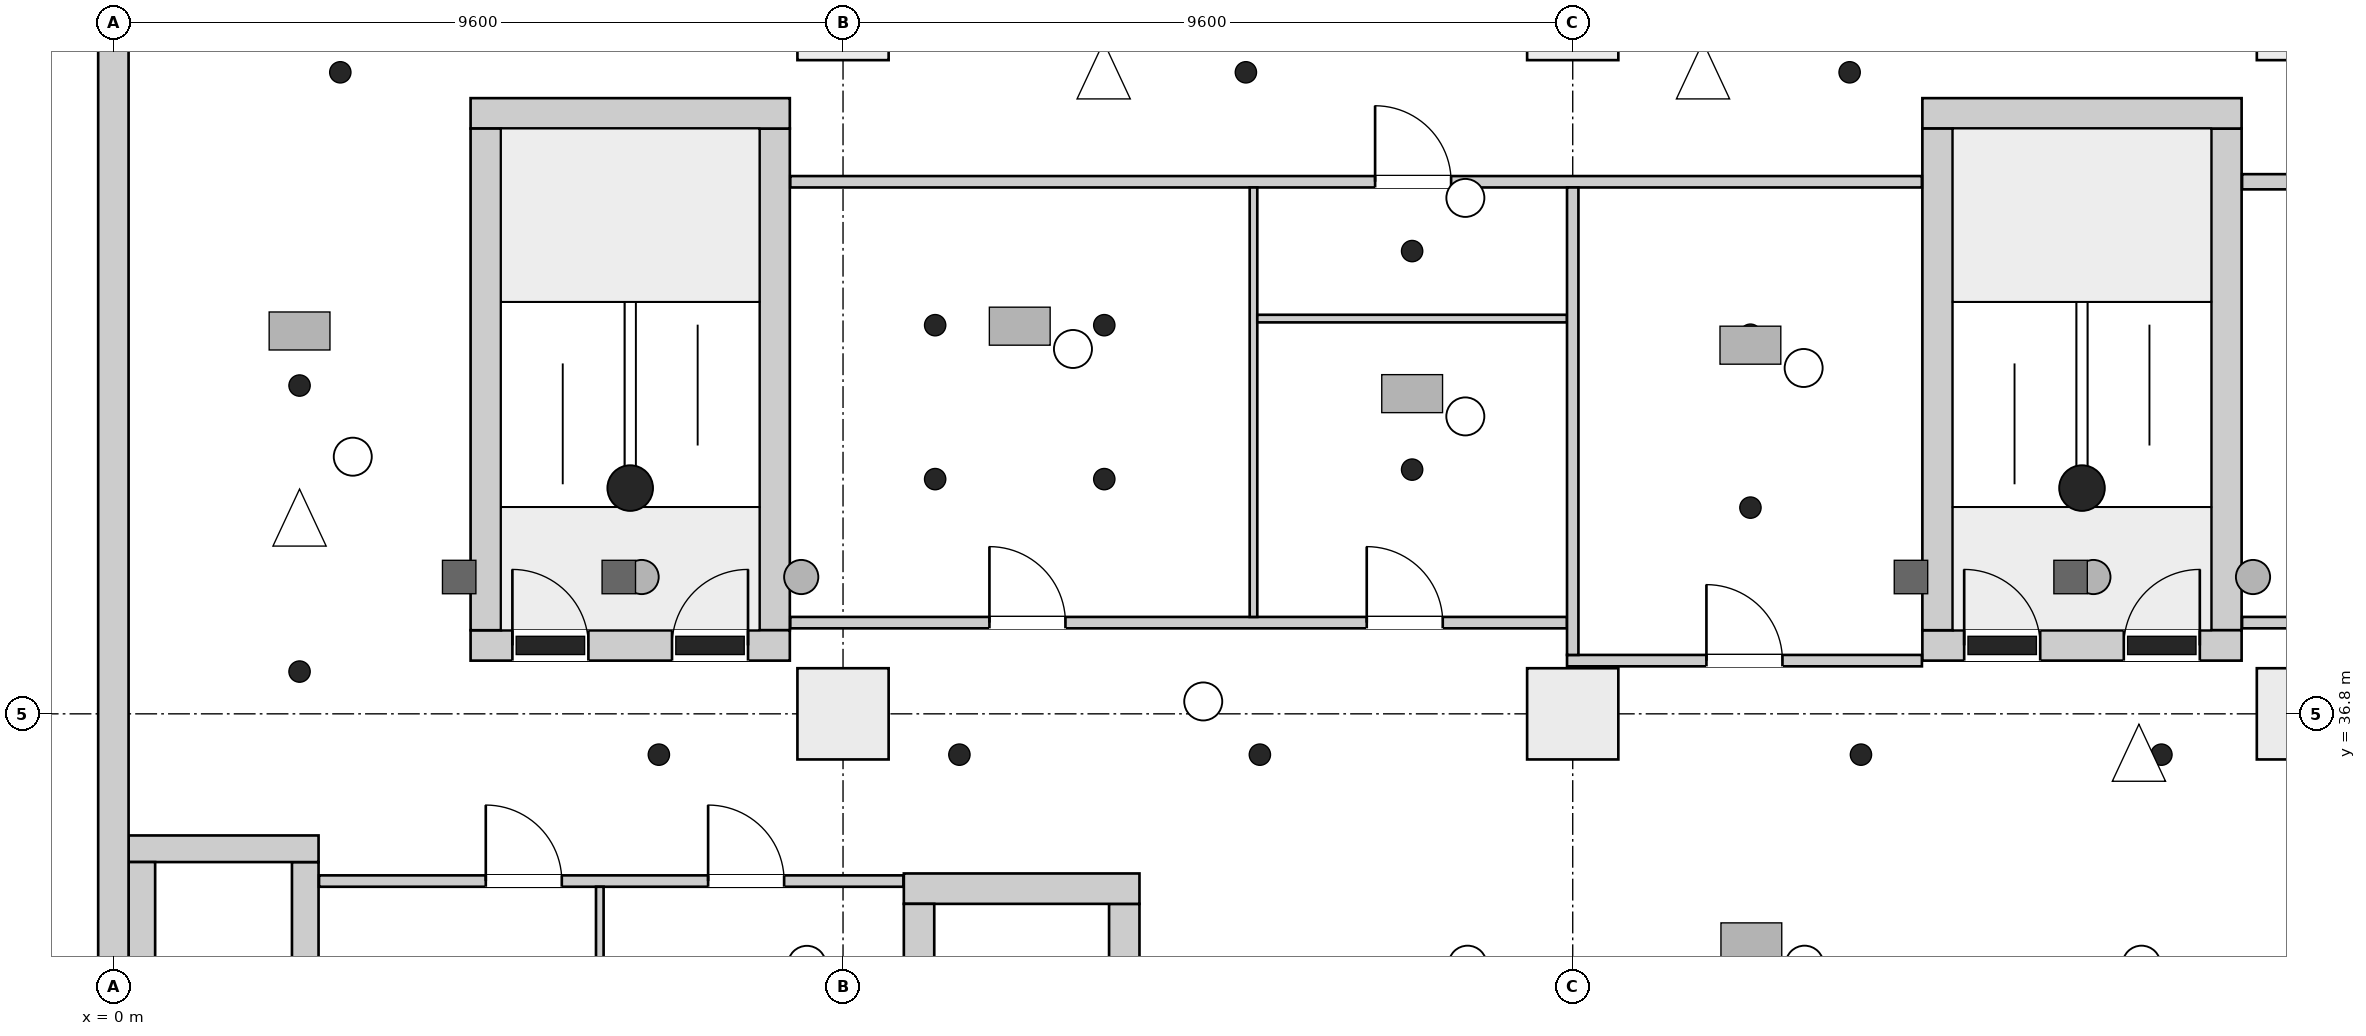
"""IFC4 building model, lengths in metres.
Left out: names, types, materials, properties, quantities, classifications, styles, units other than length and angle.
Written with IfcOpenShell. Run it as: python <this file> out.ifc"""

import sys

from ifc_helpers import new_model, si_unit, direction, frame, frame_2d, origin, origin_2d, place, context, subcontext, project, spatial, rectangle, extrude, element, fill, save


model = new_model("IFC4")
c1 = context("Model", 3, precision=1e-05, world=origin(), true_north=direction((0.0, 1.0)))
c2 = subcontext(c1, "Body", "Model", "MODEL_VIEW")
j1 = project(units=[si_unit("LENGTHUNIT", "METRE"), si_unit("PLANEANGLEUNIT", "RADIAN")], contexts=[c1])
p1 = place(None, origin())
s1 = spatial("IfcSite", under=j1, at=p1, CompositionType="ELEMENT")
p2 = place(p1, origin())
s2 = spatial("IfcBuilding", under=s1, at=p2, CompositionType="ELEMENT")
p3 = place(p2, frame((0.0, 0.0, 21.7)))
s3 = spatial("IfcBuildingStorey", under=s2, at=p3, CompositionType="ELEMENT", Elevation=21.7)
p4 = place(p3, frame((0.0, -0.2, 0.0), z_axis=(0.0, 0.0, 1.0), x_axis=(0.0, 1.0, 0.0)))
e1 = element("IfcWall", 1, at=p4, inside=s3, PredefinedType="SHEAR", context=c2, shape_type="SweptSolid", body=[
    extrude(rectangle(XDim=46.88, YDim=0.4, at=frame_2d((23.44, 0.0))), origin(), (0.0, 0.0, 1.0), 5.0),
])
p5 = place(p3, frame((4.7, 37.7, 0.0), z_axis=(0.0, 0.0, 1.0), x_axis=(1.0, 0.0, 0.0)))
e2 = element("IfcWall", 2, at=p5, inside=s3, PredefinedType="SHEAR", context=c2, shape_type="SweptSolid", body=[
    extrude(rectangle(XDim=4.2, YDim=0.4, at=frame_2d((2.1, 0.0))), origin(), (0.0, 0.0, 1.0), 5.0),
])
p6 = place(p5, frame((0.55, 0.0, 0.0)))
e3 = element("IfcOpeningElement", 3, at=p6, cuts=e2, PredefinedType="OPENING", context=c2, shape_type="SweptSolid", body=[
    extrude(rectangle(XDim=1.0, YDim=2.1, at=frame_2d((0.5, 1.05))), frame((0.0, 0.21, 0.0), z_axis=(0.0, -1.0, 0.0), x_axis=(1.0, 0.0, 0.0)), (0.0, 0.0, 1.0), 0.42),
])
p7 = place(p5, frame((2.65, 0.0, 0.0)))
e4 = element("IfcOpeningElement", 4, at=p7, cuts=e2, PredefinedType="OPENING", context=c2, shape_type="SweptSolid", body=[
    extrude(rectangle(XDim=1.0, YDim=2.1, at=frame_2d((0.5, 1.05))), frame((0.0, 0.21, 0.0), z_axis=(0.0, -1.0, 0.0), x_axis=(1.0, 0.0, 0.0)), (0.0, 0.0, 1.0), 0.42),
])
p8 = place(p3, frame((4.7, 44.7, 0.0), z_axis=(0.0, 0.0, 1.0), x_axis=(1.0, 0.0, 0.0)))
e5 = element("IfcWall", 5, at=p8, inside=s3, PredefinedType="SHEAR", context=c2, shape_type="SweptSolid", body=[
    extrude(rectangle(XDim=4.2, YDim=0.4, at=frame_2d((2.1, 0.0))), origin(), (0.0, 0.0, 1.0), 5.0),
])
for number, where, z_axis, x_axis in (
    (6, (4.9, 37.9, 0.0), (0.0, 0.0, 1.0), (0.0, 1.0, 0.0)),
    (7, (8.7, 37.9, 0.0), (0.0, 0.0, 1.0), (0.0, 1.0, 0.0)),
):
    element("IfcWall", number, at=place(p3, frame(where, z_axis=z_axis, x_axis=x_axis)), inside=s3, PredefinedType="SHEAR", context=c2, shape_type="SweptSolid", body=[
        extrude(rectangle(XDim=6.6, YDim=0.4, at=frame_2d((3.3, 0.0))), origin(), (0.0, 0.0, 1.0), 5.0),
    ])
p9 = place(p3, frame((23.8, 37.7, 0.0), z_axis=(0.0, 0.0, 1.0), x_axis=(1.0, 0.0, 0.0)))
e8 = element("IfcWall", 8, at=p9, inside=s3, PredefinedType="SHEAR", context=c2, shape_type="SweptSolid", body=[
    extrude(rectangle(XDim=4.2, YDim=0.4, at=frame_2d((2.1, 0.0))), origin(), (0.0, 0.0, 1.0), 5.0),
])
p10 = place(p9, frame((0.55, 0.0, 0.0)))
e9 = element("IfcOpeningElement", 9, at=p10, cuts=e8, PredefinedType="OPENING", context=c2, shape_type="SweptSolid", body=[
    extrude(rectangle(XDim=1.0, YDim=2.1, at=frame_2d((0.5, 1.05))), frame((0.0, 0.21, 0.0), z_axis=(0.0, -1.0, 0.0), x_axis=(1.0, 0.0, 0.0)), (0.0, 0.0, 1.0), 0.42),
])
p11 = place(p9, frame((2.65, 0.0, 0.0)))
e10 = element("IfcOpeningElement", 10, at=p11, cuts=e8, PredefinedType="OPENING", context=c2, shape_type="SweptSolid", body=[
    extrude(rectangle(XDim=1.0, YDim=2.1, at=frame_2d((0.5, 1.05))), frame((0.0, 0.21, 0.0), z_axis=(0.0, -1.0, 0.0), x_axis=(1.0, 0.0, 0.0)), (0.0, 0.0, 1.0), 0.42),
])
p12 = place(p3, frame((23.8, 44.7, 0.0), z_axis=(0.0, 0.0, 1.0), x_axis=(1.0, 0.0, 0.0)))
e11 = element("IfcWall", 11, at=p12, inside=s3, PredefinedType="SHEAR", context=c2, shape_type="SweptSolid", body=[
    extrude(rectangle(XDim=4.2, YDim=0.4, at=frame_2d((2.1, 0.0))), origin(), (0.0, 0.0, 1.0), 5.0),
])
for number, where, z_axis, x_axis in (
    (12, (24.0, 37.9, 0.0), (0.0, 0.0, 1.0), (0.0, 1.0, 0.0)),
    (13, (27.8, 37.9, 0.0), (0.0, 0.0, 1.0), (0.0, 1.0, 0.0)),
):
    element("IfcWall", number, at=place(p3, frame(where, z_axis=z_axis, x_axis=x_axis)), inside=s3, PredefinedType="SHEAR", context=c2, shape_type="SweptSolid", body=[
        extrude(rectangle(XDim=6.6, YDim=0.4, at=frame_2d((3.3, 0.0))), origin(), (0.0, 0.0, 1.0), 5.0),
    ])
p13 = place(p3, frame((0.2, 35.025, 0.0), z_axis=(0.0, 0.0, 1.0), x_axis=(1.0, 0.0, 0.0)))
e14 = element("IfcWall", 14, at=p13, inside=s3, PredefinedType="SHEAR", context=c2, shape_type="SweptSolid", body=[
    extrude(rectangle(XDim=2.5, YDim=0.35, at=frame_2d((1.25, 0.0))), origin(), (0.0, 0.0, 1.0), 5.0),
])
for number, where, z_axis, x_axis in (
    (15, (0.375, 31.35, 0.0), (0.0, 0.0, 1.0), (0.0, 1.0, 0.0)),
    (16, (2.525, 31.35, 0.0), (0.0, 0.0, 1.0), (0.0, 1.0, 0.0)),
):
    element("IfcWall", number, at=place(p3, frame(where, z_axis=z_axis, x_axis=x_axis)), inside=s3, PredefinedType="SHEAR", context=c2, shape_type="SweptSolid", body=[
        extrude(rectangle(XDim=3.5, YDim=0.35, at=frame_2d((1.75, 0.0))), origin(), (0.0, 0.0, 1.0), 5.0),
    ])
p14 = place(p3, frame((10.4, 34.5, 0.0), z_axis=(0.0, 0.0, 1.0), x_axis=(1.0, 0.0, 0.0)))
e17 = element("IfcWall", 17, at=p14, inside=s3, PredefinedType="SHEAR", context=c2, shape_type="SweptSolid", body=[
    extrude(rectangle(XDim=3.1, YDim=0.4, at=frame_2d((1.55, 0.0))), origin(), (0.0, 0.0, 1.0), 5.0),
])
for number, where, z_axis, x_axis in (
    (18, (10.6, 30.9, 0.0), (0.0, 0.0, 1.0), (0.0, 1.0, 0.0)),
    (19, (13.3, 30.9, 0.0), (0.0, 0.0, 1.0), (0.0, 1.0, 0.0)),
):
    element("IfcWall", number, at=place(p3, frame(where, z_axis=z_axis, x_axis=x_axis)), inside=s3, PredefinedType="SHEAR", context=c2, shape_type="SweptSolid", body=[
        extrude(rectangle(XDim=3.4, YDim=0.4, at=frame_2d((1.7, 0.0))), origin(), (0.0, 0.0, 1.0), 5.0),
    ])
for number, where, z_axis, x_axis in (
    (20, (9.6, 36.8, 0.0), (0.0, 0.0, 1.0), (1.0, 0.0, 0.0)),
    (21, (19.2, 36.8, 0.0), (0.0, 0.0, 1.0), (1.0, 0.0, 0.0)),
    (22, (28.8, 36.8, 0.0), (0.0, 0.0, 1.0), (1.0, 0.0, 0.0)),
    (23, (9.6, 46.0, 0.0), (0.0, 0.0, 1.0), (1.0, 0.0, 0.0)),
    (24, (19.2, 46.0, 0.0), (0.0, 0.0, 1.0), (1.0, 0.0, 0.0)),
    (25, (28.8, 46.0, 0.0), (0.0, 0.0, 1.0), (1.0, 0.0, 0.0)),
):
    element("IfcColumn", number, at=place(p3, frame(where, z_axis=z_axis, x_axis=x_axis)), inside=s3, PredefinedType="COLUMN", context=c2, shape_type="SweptSolid", body=[
        extrude(rectangle(XDim=1.2, YDim=1.2, at=origin_2d()), origin(), (0.0, 0.0, 1.0), 5.0),
    ])
p15 = place(p3, frame((2.706, 34.6, 0.0), z_axis=(0.0, 0.0, 1.0), x_axis=(1.0, 0.0, 0.0)))
e26 = element("IfcWall", 26, at=p15, inside=s3, PredefinedType="PARTITIONING", context=c2, shape_type="SweptSolid", body=[
    extrude(rectangle(XDim=7.688, YDim=0.15, at=frame_2d((3.844, 0.0))), origin(), (0.0, 0.0, 1.0), 4.65),
])
p16 = place(p15, frame((2.194, 0.0, 0.0)))
e27 = element("IfcOpeningElement", 27, at=p16, cuts=e26, PredefinedType="OPENING", context=c2, shape_type="SweptSolid", body=[
    extrude(rectangle(XDim=1.0, YDim=2.1, at=frame_2d((0.5, 1.05))), frame((0.0, 0.085, 0.0), z_axis=(0.0, -1.0, 0.0), x_axis=(1.0, 0.0, 0.0)), (0.0, 0.0, 1.0), 0.17),
])
p17 = place(p15, frame((5.119, 0.0, 0.0)))
e28 = element("IfcOpeningElement", 28, at=p17, cuts=e26, PredefinedType="OPENING", context=c2, shape_type="SweptSolid", body=[
    extrude(rectangle(XDim=1.0, YDim=2.1, at=frame_2d((0.5, 1.05))), frame((0.0, 0.085, 0.0), z_axis=(0.0, -1.0, 0.0), x_axis=(1.0, 0.0, 0.0)), (0.0, 0.0, 1.0), 0.17),
])
p18 = place(p3, frame((6.4, 24.875, 0.0), z_axis=(0.0, 0.0, 1.0), x_axis=(0.0, 1.0, 0.0)))
e29 = element("IfcWall", 29, at=p18, inside=s3, PredefinedType="PARTITIONING", context=c2, shape_type="SweptSolid", body=[
    extrude(rectangle(XDim=9.65, YDim=0.1, at=frame_2d((4.825, 0.0))), origin(), (0.0, 0.0, 1.0), 4.65),
])
p19 = place(p3, frame((8.906, 38.0, 0.0), z_axis=(0.0, 0.0, 1.0), x_axis=(1.0, 0.0, 0.0)))
e30 = element("IfcWall", 30, at=p19, inside=s3, PredefinedType="PARTITIONING", context=c2, shape_type="SweptSolid", body=[
    extrude(rectangle(XDim=10.219, YDim=0.15, at=frame_2d((5.109, 0.0))), origin(), (0.0, 0.0, 1.0), 4.65),
])
p20 = place(p19, frame((2.62, 0.0, 0.0)))
e31 = element("IfcOpeningElement", 31, at=p20, cuts=e30, PredefinedType="OPENING", context=c2, shape_type="SweptSolid", body=[
    extrude(rectangle(XDim=1.0, YDim=2.1, at=frame_2d((0.5, 1.05))), frame((0.0, 0.085, 0.0), z_axis=(0.0, -1.0, 0.0), x_axis=(1.0, 0.0, 0.0)), (0.0, 0.0, 1.0), 0.17),
])
p21 = place(p19, frame((7.584, 0.0, 0.0)))
e32 = element("IfcOpeningElement", 32, at=p21, cuts=e30, PredefinedType="OPENING", context=c2, shape_type="SweptSolid", body=[
    extrude(rectangle(XDim=1.0, YDim=2.1, at=frame_2d((0.5, 1.05))), frame((0.0, 0.085, 0.0), z_axis=(0.0, -1.0, 0.0), x_axis=(1.0, 0.0, 0.0)), (0.0, 0.0, 1.0), 0.17),
])
p22 = place(p3, frame((8.906, 43.8, 0.0), z_axis=(0.0, 0.0, 1.0), x_axis=(1.0, 0.0, 0.0)))
e33 = element("IfcWall", 33, at=p22, inside=s3, PredefinedType="PARTITIONING", context=c2, shape_type="SweptSolid", body=[
    extrude(rectangle(XDim=14.888, YDim=0.15, at=frame_2d((7.444, 0.0))), origin(), (0.0, 0.0, 1.0), 4.65),
])
p23 = place(p22, frame((7.694, 0.0, 0.0)))
e34 = element("IfcOpeningElement", 34, at=p23, cuts=e33, PredefinedType="OPENING", context=c2, shape_type="SweptSolid", body=[
    extrude(rectangle(XDim=1.0, YDim=2.1, at=frame_2d((0.5, 1.05))), frame((0.0, 0.085, 0.0), z_axis=(0.0, -1.0, 0.0), x_axis=(1.0, 0.0, 0.0)), (0.0, 0.0, 1.0), 0.17),
])
p24 = place(p3, frame((15.0, 38.075, 0.0), z_axis=(0.0, 0.0, 1.0), x_axis=(0.0, 1.0, 0.0)))
e35 = element("IfcWall", 35, at=p24, inside=s3, PredefinedType="PARTITIONING", context=c2, shape_type="SweptSolid", body=[
    extrude(rectangle(XDim=5.65, YDim=0.1, at=frame_2d((2.825, 0.0))), origin(), (0.0, 0.0, 1.0), 4.65),
])
p25 = place(p3, frame((15.05, 42.0, 0.0), z_axis=(0.0, 0.0, 1.0), x_axis=(1.0, 0.0, 0.0)))
e36 = element("IfcWall", 36, at=p25, inside=s3, PredefinedType="PARTITIONING", context=c2, shape_type="SweptSolid", body=[
    extrude(rectangle(XDim=4.075, YDim=0.1, at=frame_2d((2.038, 0.0))), origin(), (0.0, 0.0, 1.0), 4.65),
])
p26 = place(p3, frame((19.125, 37.5, 0.0), z_axis=(0.0, 0.0, 1.0), x_axis=(1.0, 0.0, 0.0)))
e37 = element("IfcWall", 37, at=p26, inside=s3, PredefinedType="PARTITIONING", context=c2, shape_type="SweptSolid", body=[
    extrude(rectangle(XDim=4.669, YDim=0.15, at=frame_2d((2.334, 0.0))), origin(), (0.0, 0.0, 1.0), 4.65),
])
p27 = place(p26, frame((1.834, 0.0, 0.0)))
e38 = element("IfcOpeningElement", 38, at=p27, cuts=e37, PredefinedType="OPENING", context=c2, shape_type="SweptSolid", body=[
    extrude(rectangle(XDim=1.0, YDim=2.1, at=frame_2d((0.5, 1.05))), frame((0.0, 0.085, 0.0), z_axis=(0.0, -1.0, 0.0), x_axis=(1.0, 0.0, 0.0)), (0.0, 0.0, 1.0), 0.17),
])
p28 = place(p3, frame((19.2, 37.575, 0.0), z_axis=(0.0, 0.0, 1.0), x_axis=(0.0, 1.0, 0.0)))
e39 = element("IfcWall", 39, at=p28, inside=s3, PredefinedType="PARTITIONING", context=c2, shape_type="SweptSolid", body=[
    extrude(rectangle(XDim=6.15, YDim=0.15, at=frame_2d((3.075, 0.0))), origin(), (0.0, 0.0, 1.0), 4.25),
])
p29 = place(p3, frame((28.006, 38.0, 0.0), z_axis=(0.0, 0.0, 1.0), x_axis=(1.0, 0.0, 0.0)))
e40 = element("IfcWall", 40, at=p29, inside=s3, PredefinedType="PARTITIONING", context=c2, shape_type="SweptSolid", body=[
    extrude(rectangle(XDim=1.894, YDim=0.15, at=frame_2d((0.947, 0.0))), origin(), (0.0, 0.0, 1.0), 4.65),
])
p30 = place(p3, frame((28.006, 43.8, 0.0), z_axis=(0.0, 0.0, 1.0), x_axis=(1.0, 0.0, 0.0)))
e41 = element("IfcWall", 41, at=p30, inside=s3, PredefinedType="PARTITIONING", context=c2, shape_type="SweptSolid", body=[
    extrude(rectangle(XDim=29.388, YDim=0.2, at=frame_2d((14.694, 0.0))), origin(), (0.0, 0.0, 1.0), 4.65),
])
p31 = place(p6, origin())
e42 = element("IfcDoor", 42, at=p31, inside=s3, OperationType="SINGLE_SWING_RIGHT", PredefinedType="DOOR", context=c2, shape_type="SweptSolid", body=[
    extrude(rectangle(XDim=1.0, YDim=2.1, at=frame_2d((0.5, 1.05))), frame((0.0, 0.025, 0.0), z_axis=(0.0, -1.0, 0.0), x_axis=(1.0, 0.0, 0.0)), (0.0, 0.0, 1.0), 0.05),
])
fill(e3, e42)
p32 = place(p7, origin())
e43 = element("IfcDoor", 43, at=p32, inside=s3, OperationType="SINGLE_SWING_LEFT", PredefinedType="DOOR", context=c2, shape_type="SweptSolid", body=[
    extrude(rectangle(XDim=1.0, YDim=2.1, at=frame_2d((0.5, 1.05))), frame((0.0, 0.025, 0.0), z_axis=(0.0, -1.0, 0.0), x_axis=(1.0, 0.0, 0.0)), (0.0, 0.0, 1.0), 0.05),
])
fill(e4, e43)
p33 = place(p10, origin())
e44 = element("IfcDoor", 44, at=p33, inside=s3, OperationType="SINGLE_SWING_RIGHT", PredefinedType="DOOR", context=c2, shape_type="SweptSolid", body=[
    extrude(rectangle(XDim=1.0, YDim=2.1, at=frame_2d((0.5, 1.05))), frame((0.0, 0.025, 0.0), z_axis=(0.0, -1.0, 0.0), x_axis=(1.0, 0.0, 0.0)), (0.0, 0.0, 1.0), 0.05),
])
fill(e9, e44)
p34 = place(p11, origin())
e45 = element("IfcDoor", 45, at=p34, inside=s3, OperationType="SINGLE_SWING_LEFT", PredefinedType="DOOR", context=c2, shape_type="SweptSolid", body=[
    extrude(rectangle(XDim=1.0, YDim=2.1, at=frame_2d((0.5, 1.05))), frame((0.0, 0.025, 0.0), z_axis=(0.0, -1.0, 0.0), x_axis=(1.0, 0.0, 0.0)), (0.0, 0.0, 1.0), 0.05),
])
fill(e10, e45)
p35 = place(p16, origin())
e46 = element("IfcDoor", 46, at=p35, inside=s3, OperationType="SINGLE_SWING_RIGHT", PredefinedType="DOOR", context=c2, shape_type="SweptSolid", body=[
    extrude(rectangle(XDim=1.0, YDim=2.1, at=frame_2d((0.5, 1.05))), frame((0.0, 0.025, 0.0), z_axis=(0.0, -1.0, 0.0), x_axis=(1.0, 0.0, 0.0)), (0.0, 0.0, 1.0), 0.05),
])
fill(e27, e46)
p36 = place(p17, origin())
e47 = element("IfcDoor", 47, at=p36, inside=s3, OperationType="SINGLE_SWING_LEFT", PredefinedType="DOOR", context=c2, shape_type="SweptSolid", body=[
    extrude(rectangle(XDim=1.0, YDim=2.1, at=frame_2d((0.5, 1.05))), frame((0.0, 0.025, 0.0), z_axis=(0.0, -1.0, 0.0), x_axis=(1.0, 0.0, 0.0)), (0.0, 0.0, 1.0), 0.05),
])
fill(e28, e47)
p37 = place(p27, origin())
e48 = element("IfcDoor", 48, at=p37, inside=s3, OperationType="SINGLE_SWING_LEFT", PredefinedType="DOOR", context=c2, shape_type="SweptSolid", body=[
    extrude(rectangle(XDim=1.0, YDim=2.1, at=frame_2d((0.5, 1.05))), frame((0.0, 0.025, 0.0), z_axis=(0.0, -1.0, 0.0), x_axis=(1.0, 0.0, 0.0)), (0.0, 0.0, 1.0), 0.05),
])
fill(e38, e48)
p38 = place(p20, origin())
e49 = element("IfcDoor", 49, at=p38, inside=s3, OperationType="SINGLE_SWING_LEFT", PredefinedType="DOOR", context=c2, shape_type="SweptSolid", body=[
    extrude(rectangle(XDim=1.0, YDim=2.1, at=frame_2d((0.5, 1.05))), frame((0.0, 0.025, 0.0), z_axis=(0.0, -1.0, 0.0), x_axis=(1.0, 0.0, 0.0)), (0.0, 0.0, 1.0), 0.05),
])
fill(e31, e49)
p39 = place(p21, origin())
e50 = element("IfcDoor", 50, at=p39, inside=s3, OperationType="SINGLE_SWING_RIGHT", PredefinedType="DOOR", context=c2, shape_type="SweptSolid", body=[
    extrude(rectangle(XDim=1.0, YDim=2.1, at=frame_2d((0.5, 1.05))), frame((0.0, 0.025, 0.0), z_axis=(0.0, -1.0, 0.0), x_axis=(1.0, 0.0, 0.0)), (0.0, 0.0, 1.0), 0.05),
])
fill(e32, e50)
p40 = place(p23, origin())
e51 = element("IfcDoor", 51, at=p40, inside=s3, OperationType="SINGLE_SWING_LEFT", PredefinedType="DOOR", context=c2, shape_type="SweptSolid", body=[
    extrude(rectangle(XDim=1.0, YDim=2.1, at=frame_2d((0.5, 1.05))), frame((0.0, 0.025, 0.0), z_axis=(0.0, -1.0, 0.0), x_axis=(1.0, 0.0, 0.0)), (0.0, 0.0, 1.0), 0.05),
])
fill(e34, e51)
save(model, sys.argv[1])
